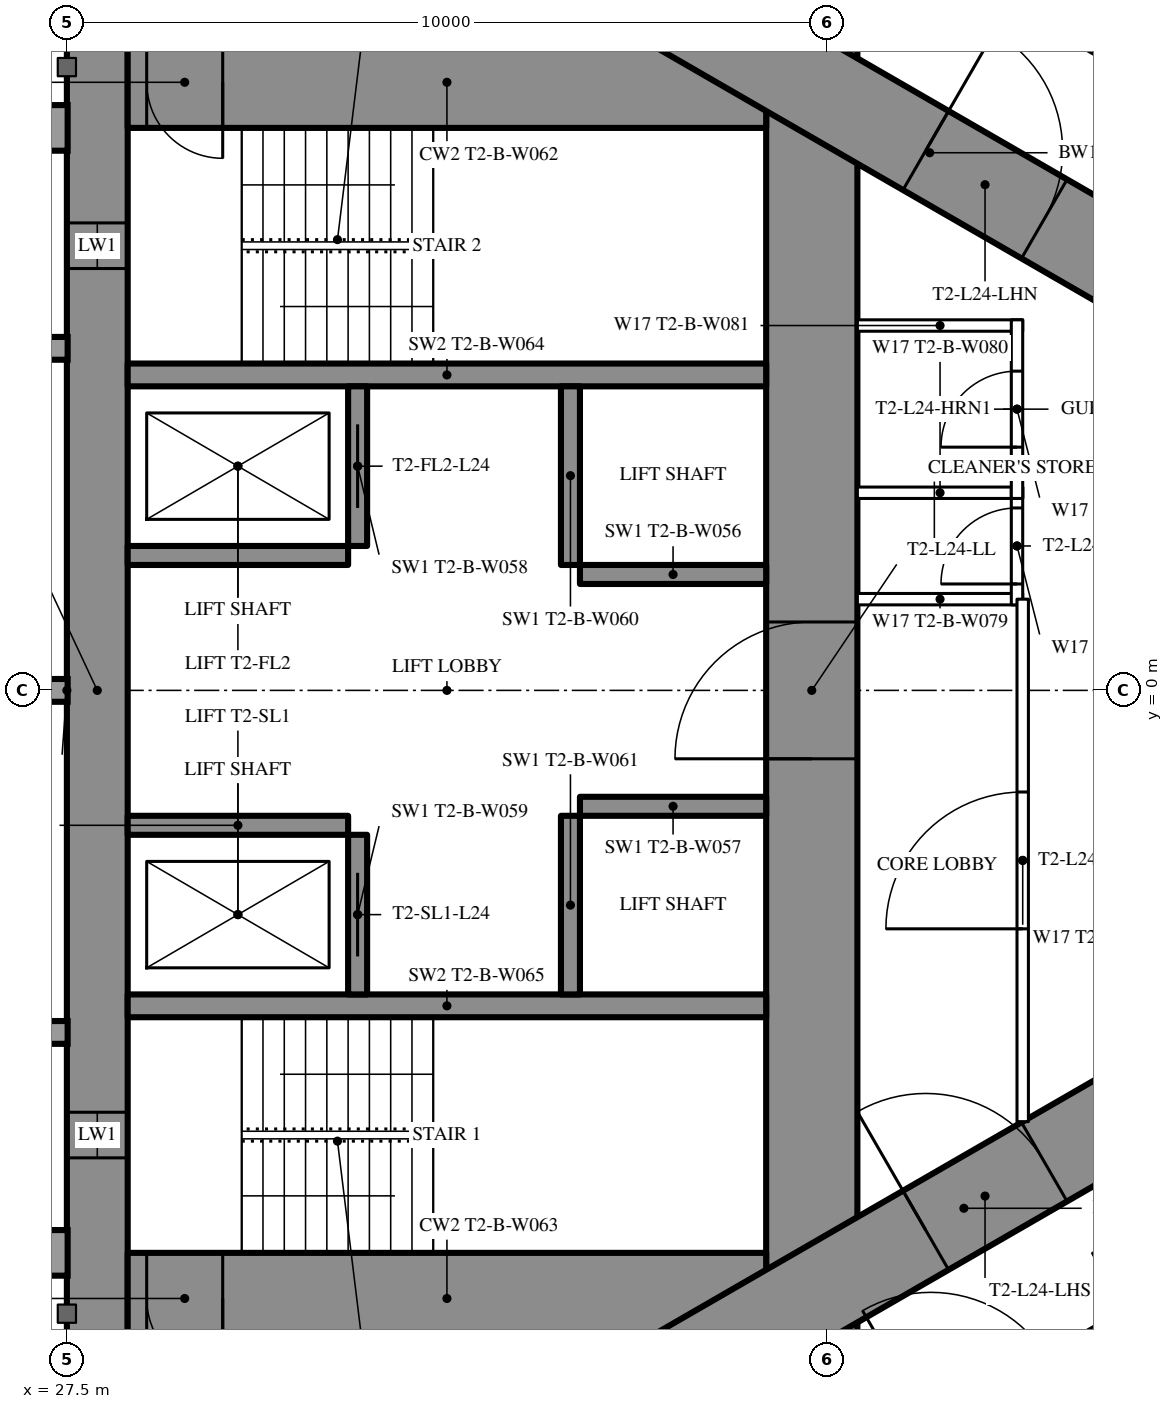
"""IFC4 building model, lengths in metres.
Left out: names, types, materials, properties, quantities, classifications, styles, units other than length and angle.
Written with IfcOpenShell. Run it as: python <this file> out.ifc"""

import sys

from ifc_helpers import new_model, si_unit, direction, frame, frame_2d, origin, place, context, subcontext, project, spatial, rectangle, extrude, element, fill, save


model = new_model("IFC4")
c1 = context("Model", 3, precision=1e-05, world=origin(), true_north=direction((0.0, 1.0)))
c2 = subcontext(c1, "Body", "Model", "MODEL_VIEW")
j1 = project(units=[si_unit("LENGTHUNIT", "METRE"), si_unit("PLANEANGLEUNIT", "RADIAN")], contexts=[c1])
p1 = place(None, origin())
s1 = spatial("IfcSite", under=j1, at=p1, CompositionType="ELEMENT")
p2 = place(p1, origin())
s2 = spatial("IfcBuilding", under=s1, at=p2, CompositionType="ELEMENT")
p3 = place(p2, frame((0.0, 0.0, 94.1)))
s3 = spatial("IfcBuildingStorey", under=s2, at=p3, CompositionType="ELEMENT", Elevation=94.1)
p4 = place(p3, frame((27.9, -8.6, 0.0), z_axis=(0.0, 0.0, 1.0), x_axis=(0.0, 1.0, 0.0)))
e1 = element("IfcWall", 1, at=p4, inside=s3, PredefinedType="SHEAR", context=c2, shape_type="SweptSolid", body=[
    extrude(rectangle(XDim=17.2, YDim=0.8, at=frame_2d((8.6, 0.0))), origin(), (0.0, 0.0, 1.0), 3.5),
])
p5 = place(p4, frame((2.45, 0.0, 0.6)))
e2 = element("IfcOpeningElement", 2, at=p5, cuts=e1, PredefinedType="OPENING", context=c2, shape_type="SweptSolid", body=[
    extrude(rectangle(XDim=0.6, YDim=2.1, at=frame_2d((0.3, 1.05))), frame((0.0, 0.41, 0.0), z_axis=(0.0, -1.0, 0.0), x_axis=(1.0, 0.0, 0.0)), (0.0, 0.0, 1.0), 0.82),
])
p6 = place(p4, frame((14.15, 0.0, 0.6)))
e3 = element("IfcOpeningElement", 3, at=p6, cuts=e1, PredefinedType="OPENING", context=c2, shape_type="SweptSolid", body=[
    extrude(rectangle(XDim=0.6, YDim=2.1, at=frame_2d((0.3, 1.05))), frame((0.0, 0.41, 0.0), z_axis=(0.0, -1.0, 0.0), x_axis=(1.0, 0.0, 0.0)), (0.0, 0.0, 1.0), 0.82),
])
p7 = place(p3, frame((37.3, -8.6, 0.0), z_axis=(0.0, 0.0, 1.0), x_axis=(0.0, 1.0, 0.0)))
e4 = element("IfcWall", 4, at=p7, inside=s3, PredefinedType="SHEAR", context=c2, shape_type="SweptSolid", body=[
    extrude(rectangle(XDim=17.2, YDim=1.2, at=frame_2d((8.6, 0.0))), origin(), (0.0, 0.0, 1.0), 3.5),
])
p8 = place(p7, frame((7.7, 0.0, 0.0)))
e5 = element("IfcOpeningElement", 5, at=p8, cuts=e4, PredefinedType="OPENING", context=c2, shape_type="SweptSolid", body=[
    extrude(rectangle(XDim=1.8, YDim=2.2, at=frame_2d((0.9, 1.1))), frame((0.0, 0.61, 0.0), z_axis=(0.0, -1.0, 0.0), x_axis=(1.0, 0.0, 0.0)), (0.0, 0.0, 1.0), 1.22),
])
p9 = place(p3, frame((28.3, -8.0, 0.0), z_axis=(0.0, 0.0, 1.0), x_axis=(1.0, 0.0, 0.0)))
e6 = element("IfcWall", 6, at=p9, inside=s3, PredefinedType="SHEAR", context=c2, shape_type="SweptSolid", body=[
    extrude(rectangle(XDim=8.4, YDim=1.2, at=frame_2d((4.2, 0.0))), origin(), (0.0, 0.0, 1.0), 3.5),
])
p10 = place(p9, frame((0.25, 0.0, 0.0)))
e7 = element("IfcOpeningElement", 7, at=p10, cuts=e6, PredefinedType="OPENING", context=c2, shape_type="SweptSolid", body=[
    extrude(rectangle(XDim=1.0, YDim=2.2, at=frame_2d((0.5, 1.1))), frame((0.0, 0.61, 0.0), z_axis=(0.0, -1.0, 0.0), x_axis=(1.0, 0.0, 0.0)), (0.0, 0.0, 1.0), 1.22),
])
p11 = place(p3, frame((28.3, 8.0, 0.0), z_axis=(0.0, 0.0, 1.0), x_axis=(1.0, 0.0, 0.0)))
e8 = element("IfcWall", 8, at=p11, inside=s3, PredefinedType="SHEAR", context=c2, shape_type="SweptSolid", body=[
    extrude(rectangle(XDim=8.4, YDim=1.2, at=frame_2d((4.2, 0.0))), origin(), (0.0, 0.0, 1.0), 3.5),
])
p12 = place(p11, frame((0.25, 0.0, 0.0)))
e9 = element("IfcOpeningElement", 9, at=p12, cuts=e8, PredefinedType="OPENING", context=c2, shape_type="SweptSolid", body=[
    extrude(rectangle(XDim=1.0, YDim=2.2, at=frame_2d((0.5, 1.1))), frame((0.0, 0.61, 0.0), z_axis=(0.0, -1.0, 0.0), x_axis=(1.0, 0.0, 0.0)), (0.0, 0.0, 1.0), 1.22),
])
for number, where, z_axis, x_axis in (
    (10, (28.3, -4.15, 0.0), (0.0, 0.0, 1.0), (1.0, 0.0, 0.0)),
    (11, (28.3, 4.15, 0.0), (0.0, 0.0, 1.0), (1.0, 0.0, 0.0)),
):
    element("IfcWall", number, at=place(p3, frame(where, z_axis=z_axis, x_axis=x_axis)), inside=s3, PredefinedType="SHEAR", context=c2, shape_type="SweptSolid", body=[
        extrude(rectangle(XDim=8.4, YDim=0.3, at=frame_2d((4.2, 0.0))), origin(), (0.0, 0.0, 1.0), 3.5),
    ])
p13 = place(p3, frame((31.325, -4.0, 0.0), z_axis=(0.0, 0.0, 1.0), x_axis=(0.0, 1.0, 0.0)))
e12 = element("IfcWall", 12, at=p13, inside=s3, PredefinedType="SHEAR", context=c2, shape_type="SweptSolid", body=[
    extrude(rectangle(XDim=2.1, YDim=0.25, at=frame_2d((1.05, 0.0))), origin(), (0.0, 0.0, 1.0), 3.5),
])
p14 = place(p13, frame((0.5, 0.0, 0.0)))
e13 = element("IfcOpeningElement", 13, at=p14, cuts=e12, PredefinedType="OPENING", context=c2, shape_type="SweptSolid", body=[
    extrude(rectangle(XDim=1.1, YDim=2.2, at=frame_2d((0.55, 1.1))), frame((0.0, 0.135, 0.0), z_axis=(0.0, -1.0, 0.0), x_axis=(1.0, 0.0, 0.0)), (0.0, 0.0, 1.0), 0.27),
])
p15 = place(p3, frame((34.125, -4.0, 0.0), z_axis=(0.0, 0.0, 1.0), x_axis=(0.0, 1.0, 0.0)))
e14 = element("IfcWall", 14, at=p15, inside=s3, PredefinedType="SHEAR", context=c2, shape_type="SweptSolid", body=[
    extrude(rectangle(XDim=2.35, YDim=0.25, at=frame_2d((1.175, 0.0))), origin(), (0.0, 0.0, 1.0), 3.5),
])
p16 = place(p3, frame((28.3, -1.775, 0.0), z_axis=(0.0, 0.0, 1.0), x_axis=(1.0, 0.0, 0.0)))
e15 = element("IfcWall", 15, at=p16, inside=s3, PredefinedType="SHEAR", context=c2, shape_type="SweptSolid", body=[
    extrude(rectangle(XDim=2.9, YDim=0.25, at=frame_2d((1.45, 0.0))), origin(), (0.0, 0.0, 1.0), 3.5),
])
p17 = place(p3, frame((34.25, -1.525, 0.0), z_axis=(0.0, 0.0, 1.0), x_axis=(1.0, 0.0, 0.0)))
e16 = element("IfcWall", 16, at=p17, inside=s3, PredefinedType="SHEAR", context=c2, shape_type="SweptSolid", body=[
    extrude(rectangle(XDim=2.45, YDim=0.25, at=frame_2d((1.225, 0.0))), origin(), (0.0, 0.0, 1.0), 3.5),
])
p18 = place(p3, frame((31.325, 1.9, 0.0), z_axis=(0.0, 0.0, 1.0), x_axis=(0.0, 1.0, 0.0)))
e17 = element("IfcWall", 17, at=p18, inside=s3, PredefinedType="SHEAR", context=c2, shape_type="SweptSolid", body=[
    extrude(rectangle(XDim=2.1, YDim=0.25, at=frame_2d((1.05, 0.0))), origin(), (0.0, 0.0, 1.0), 3.5),
])
p19 = place(p18, frame((0.5, 0.0, 0.0)))
e18 = element("IfcOpeningElement", 18, at=p19, cuts=e17, PredefinedType="OPENING", context=c2, shape_type="SweptSolid", body=[
    extrude(rectangle(XDim=1.1, YDim=2.2, at=frame_2d((0.55, 1.1))), frame((0.0, 0.135, 0.0), z_axis=(0.0, -1.0, 0.0), x_axis=(1.0, 0.0, 0.0)), (0.0, 0.0, 1.0), 0.27),
])
p20 = place(p3, frame((34.125, 1.65, 0.0), z_axis=(0.0, 0.0, 1.0), x_axis=(0.0, 1.0, 0.0)))
e19 = element("IfcWall", 19, at=p20, inside=s3, PredefinedType="SHEAR", context=c2, shape_type="SweptSolid", body=[
    extrude(rectangle(XDim=2.35, YDim=0.25, at=frame_2d((1.175, 0.0))), origin(), (0.0, 0.0, 1.0), 3.5),
])
p21 = place(p3, frame((28.3, 1.775, 0.0), z_axis=(0.0, 0.0, 1.0), x_axis=(1.0, 0.0, 0.0)))
e20 = element("IfcWall", 20, at=p21, inside=s3, PredefinedType="SHEAR", context=c2, shape_type="SweptSolid", body=[
    extrude(rectangle(XDim=2.9, YDim=0.25, at=frame_2d((1.45, 0.0))), origin(), (0.0, 0.0, 1.0), 3.5),
])
p22 = place(p3, frame((34.25, 1.525, 0.0), z_axis=(0.0, 0.0, 1.0), x_axis=(1.0, 0.0, 0.0)))
e21 = element("IfcWall", 21, at=p22, inside=s3, PredefinedType="SHEAR", context=c2, shape_type="SweptSolid", body=[
    extrude(rectangle(XDim=2.45, YDim=0.25, at=frame_2d((1.225, 0.0))), origin(), (0.0, 0.0, 1.0), 3.5),
])
p23 = place(p3, frame((27.2, -13.8, 0.0), z_axis=(0.0, 0.0, 1.0), x_axis=(0.866027159892, 0.499996958321, 0.0)))
e22 = element("IfcWall", 22, at=p23, inside=s3, PredefinedType="SHEAR", context=c2, shape_type="SweptSolid", body=[
    extrude(rectangle(XDim=27.947, YDim=1.2, at=frame_2d((13.973, 0.0))), origin(), (0.0, 0.0, 1.0), 3.5),
])
p24 = place(p23, frame((4.6, 0.0, 0.0)))
e23 = element("IfcOpeningElement", 23, at=p24, cuts=e22, PredefinedType="OPENING", context=c2, shape_type="SweptSolid", body=[
    extrude(rectangle(XDim=1.0, YDim=2.2, at=frame_2d((0.5, 1.1))), frame((0.0, 0.61, 0.0), z_axis=(0.0, -1.0, 0.0), x_axis=(1.0, 0.0, 0.0)), (0.0, 0.0, 1.0), 1.22),
])
p25 = place(p23, frame((13.395, 0.0, 0.0)))
e24 = element("IfcOpeningElement", 24, at=p25, cuts=e22, PredefinedType="OPENING", context=c2, shape_type="SweptSolid", body=[
    extrude(rectangle(XDim=1.8, YDim=2.2, at=frame_2d((0.9, 1.1))), frame((0.0, 0.61, 0.0), z_axis=(0.0, -1.0, 0.0), x_axis=(1.0, 0.0, 0.0)), (0.0, 0.0, 1.0), 1.22),
])
p26 = place(p3, frame((27.2, 13.8, 0.0), z_axis=(0.0, 0.0, 1.0), x_axis=(0.866024515034, -0.500001539357, 0.0)))
e25 = element("IfcWall", 25, at=p26, inside=s3, PredefinedType="SHEAR", context=c2, shape_type="SweptSolid", body=[
    extrude(rectangle(XDim=26.907, YDim=1.2, at=frame_2d((13.454, 0.0))), origin(), (0.0, 0.0, 1.0), 3.5),
])
p27 = place(p26, frame((4.6, 0.0, 0.0)))
e26 = element("IfcOpeningElement", 26, at=p27, cuts=e25, PredefinedType="OPENING", context=c2, shape_type="SweptSolid", body=[
    extrude(rectangle(XDim=1.0, YDim=2.2, at=frame_2d((0.5, 1.1))), frame((0.0, 0.61, 0.0), z_axis=(0.0, -1.0, 0.0), x_axis=(1.0, 0.0, 0.0)), (0.0, 0.0, 1.0), 1.22),
])
p28 = place(p26, frame((13.395, 0.0, 0.0)))
e27 = element("IfcOpeningElement", 27, at=p28, cuts=e25, PredefinedType="OPENING", context=c2, shape_type="SweptSolid", body=[
    extrude(rectangle(XDim=1.8, YDim=2.2, at=frame_2d((0.9, 1.1))), frame((0.0, 0.61, 0.0), z_axis=(0.0, -1.0, 0.0), x_axis=(1.0, 0.0, 0.0)), (0.0, 0.0, 1.0), 1.22),
])
p29 = place(p3, frame((37.96, -10.243, 0.0), z_axis=(0.0, 0.0, 1.0), x_axis=(0.866026429433, 0.499998223521, 0.0)))
e28 = element("IfcWall", 28, at=p29, inside=s3, PredefinedType="PARTITIONING", context=c2, shape_type="SweptSolid", body=[
    extrude(rectangle(XDim=20.487, YDim=0.2, at=frame_2d((10.243, 0.0))), origin(), (0.0, 0.0, 1.0), 3.25),
])
p30 = place(p29, frame((4.047, 0.0, 0.0)))
e29 = element("IfcOpeningElement", 29, at=p30, cuts=e28, PredefinedType="OPENING", context=c2, shape_type="SweptSolid", body=[
    extrude(rectangle(XDim=0.95, YDim=2.2, at=frame_2d((0.475, 1.1))), frame((0.0, 0.11, 0.0), z_axis=(0.0, -1.0, 0.0), x_axis=(1.0, 0.0, 0.0)), (0.0, 0.0, 1.0), 0.22),
])
p31 = place(p29, frame((11.04, 0.0, 0.0)))
e30 = element("IfcOpeningElement", 30, at=p31, cuts=e28, PredefinedType="OPENING", context=c2, shape_type="SweptSolid", body=[
    extrude(rectangle(XDim=0.95, YDim=2.2, at=frame_2d((0.475, 1.1))), frame((0.0, 0.11, 0.0), z_axis=(0.0, -1.0, 0.0), x_axis=(1.0, 0.0, 0.0)), (0.0, 0.0, 1.0), 0.22),
])
p32 = place(p29, frame((13.035, 0.0, 0.0)))
e31 = element("IfcOpeningElement", 31, at=p32, cuts=e28, PredefinedType="OPENING", context=c2, shape_type="SweptSolid", body=[
    extrude(rectangle(XDim=0.95, YDim=2.2, at=frame_2d((0.475, 1.1))), frame((0.0, 0.11, 0.0), z_axis=(0.0, -1.0, 0.0), x_axis=(1.0, 0.0, 0.0)), (0.0, 0.0, 1.0), 0.22),
])
p33 = place(p29, frame((17.085, 0.0, 0.0)))
e32 = element("IfcOpeningElement", 32, at=p33, cuts=e28, PredefinedType="OPENING", context=c2, shape_type="SweptSolid", body=[
    extrude(rectangle(XDim=0.95, YDim=2.2, at=frame_2d((0.475, 1.1))), frame((0.0, 0.11, 0.0), z_axis=(0.0, -1.0, 0.0), x_axis=(1.0, 0.0, 0.0)), (0.0, 0.0, 1.0), 0.22),
])
p34 = place(p29, frame((1.048, 0.0, 0.0)))
e33 = element("IfcOpeningElement", 33, at=p34, cuts=e28, PredefinedType="OPENING", context=c2, shape_type="SweptSolid", body=[
    extrude(rectangle(XDim=1.8, YDim=2.2, at=frame_2d((0.9, 1.1))), frame((0.0, 0.11, 0.0), z_axis=(0.0, -1.0, 0.0), x_axis=(1.0, 0.0, 0.0)), (0.0, 0.0, 1.0), 0.22),
])
p35 = place(p3, frame((36.834, 10.894, 0.0), z_axis=(0.0, 0.0, 1.0), x_axis=(0.866028157229, -0.499995230863, 0.0)))
e34 = element("IfcWall", 34, at=p35, inside=s3, PredefinedType="PARTITIONING", context=c2, shape_type="SweptSolid", body=[
    extrude(rectangle(XDim=21.667, YDim=0.2, at=frame_2d((10.833, 0.0))), origin(), (0.0, 0.0, 1.0), 3.25),
])
p36 = place(p35, frame((14.04, 0.0, 0.0)))
e35 = element("IfcOpeningElement", 35, at=p36, cuts=e34, PredefinedType="OPENING", context=c2, shape_type="SweptSolid", body=[
    extrude(rectangle(XDim=0.95, YDim=2.2, at=frame_2d((0.475, 1.1))), frame((0.0, 0.11, 0.0), z_axis=(0.0, -1.0, 0.0), x_axis=(1.0, 0.0, 0.0)), (0.0, 0.0, 1.0), 0.22),
])
p37 = place(p35, frame((9.99, 0.0, 0.0)))
e36 = element("IfcOpeningElement", 36, at=p37, cuts=e34, PredefinedType="OPENING", context=c2, shape_type="SweptSolid", body=[
    extrude(rectangle(XDim=0.95, YDim=2.2, at=frame_2d((0.475, 1.1))), frame((0.0, 0.11, 0.0), z_axis=(0.0, -1.0, 0.0), x_axis=(1.0, 0.0, 0.0)), (0.0, 0.0, 1.0), 0.22),
])
p38 = place(p35, frame((3.35, 0.0, 0.0)))
e37 = element("IfcOpeningElement", 37, at=p38, cuts=e34, PredefinedType="OPENING", context=c2, shape_type="SweptSolid", body=[
    extrude(rectangle(XDim=1.0, YDim=2.2, at=frame_2d((0.5, 1.1))), frame((0.0, 0.11, 0.0), z_axis=(0.0, -1.0, 0.0), x_axis=(1.0, 0.0, 0.0)), (0.0, 0.0, 1.0), 0.22),
])
for number, where, z_axis, x_axis in (
    (38, (37.9, 1.2, 0.0), (0.0, 0.0, 1.0), (1.0, 0.0, 0.0)),
    (39, (37.9, 2.6, 0.0), (0.0, 0.0, 1.0), (1.0, 0.0, 0.0)),
    (40, (37.9, 4.8, 0.0), (0.0, 0.0, 1.0), (1.0, 0.0, 0.0)),
):
    element("IfcWall", number, at=place(p3, frame(where, z_axis=z_axis, x_axis=x_axis)), inside=s3, PredefinedType="PARTITIONING", context=c2, shape_type="SweptSolid", body=[
        extrude(rectangle(XDim=2.175, YDim=0.15, at=frame_2d((1.087, 0.0))), origin(), (0.0, 0.0, 1.0), 3.25),
    ])
p39 = place(p3, frame((40.0, 1.125, 0.0), z_axis=(0.0, 0.0, 1.0), x_axis=(0.0, 1.0, 0.0)))
e41 = element("IfcWall", 41, at=p39, inside=s3, PredefinedType="PARTITIONING", context=c2, shape_type="SweptSolid", body=[
    extrude(rectangle(XDim=1.55, YDim=0.15, at=frame_2d((0.775, 0.0))), origin(), (0.0, 0.0, 1.0), 3.25),
])
p40 = place(p39, frame((0.275, 0.0, 0.0)))
e42 = element("IfcOpeningElement", 42, at=p40, cuts=e41, PredefinedType="OPENING", context=c2, shape_type="SweptSolid", body=[
    extrude(rectangle(XDim=1.0, YDim=2.2, at=frame_2d((0.5, 1.1))), frame((0.0, 0.085, 0.0), z_axis=(0.0, -1.0, 0.0), x_axis=(1.0, 0.0, 0.0)), (0.0, 0.0, 1.0), 0.17),
])
p41 = place(p3, frame((40.0, 2.525, 0.0), z_axis=(0.0, 0.0, 1.0), x_axis=(0.0, 1.0, 0.0)))
e43 = element("IfcWall", 43, at=p41, inside=s3, PredefinedType="PARTITIONING", context=c2, shape_type="SweptSolid", body=[
    extrude(rectangle(XDim=2.35, YDim=0.15, at=frame_2d((1.175, 0.0))), origin(), (0.0, 0.0, 1.0), 3.25),
])
p42 = place(p41, frame((0.675, 0.0, 0.0)))
e44 = element("IfcOpeningElement", 44, at=p42, cuts=e43, PredefinedType="OPENING", context=c2, shape_type="SweptSolid", body=[
    extrude(rectangle(XDim=1.0, YDim=2.2, at=frame_2d((0.5, 1.1))), frame((0.0, 0.085, 0.0), z_axis=(0.0, -1.0, 0.0), x_axis=(1.0, 0.0, 0.0)), (0.0, 0.0, 1.0), 0.17),
])
p43 = place(p3, frame((40.075, -5.674, 0.0), z_axis=(0.0, 0.0, 1.0), x_axis=(0.0, 1.0, 0.0)))
e45 = element("IfcWall", 45, at=p43, inside=s3, PredefinedType="PARTITIONING", context=c2, shape_type="SweptSolid", body=[
    extrude(rectangle(XDim=6.874, YDim=0.15, at=frame_2d((3.437, 0.0))), origin(), (0.0, 0.0, 1.0), 3.25),
])
p44 = place(p43, frame((2.537, 0.0, 0.0)))
e46 = element("IfcOpeningElement", 46, at=p44, cuts=e45, PredefinedType="OPENING", context=c2, shape_type="SweptSolid", body=[
    extrude(rectangle(XDim=1.8, YDim=2.2, at=frame_2d((0.9, 1.1))), frame((0.0, 0.085, 0.0), z_axis=(0.0, -1.0, 0.0), x_axis=(1.0, 0.0, 0.0)), (0.0, 0.0, 1.0), 0.17),
])
p45 = place(p40, origin())
e47 = element("IfcDoor", 47, at=p45, inside=s3, OperationType="SINGLE_SWING_LEFT", PredefinedType="DOOR", context=c2, shape_type="SweptSolid", body=[
    extrude(rectangle(XDim=1.0, YDim=2.2, at=frame_2d((0.5, 1.1))), frame((0.0, 0.025, 0.0), z_axis=(0.0, -1.0, 0.0), x_axis=(1.0, 0.0, 0.0)), (0.0, 0.0, 1.0), 0.05),
])
fill(e42, e47)
p46 = place(p42, origin())
e48 = element("IfcDoor", 48, at=p46, inside=s3, OperationType="SINGLE_SWING_LEFT", PredefinedType="DOOR", context=c2, shape_type="SweptSolid", body=[
    extrude(rectangle(XDim=1.0, YDim=2.2, at=frame_2d((0.5, 1.1))), frame((0.0, 0.025, 0.0), z_axis=(0.0, -1.0, 0.0), x_axis=(1.0, 0.0, 0.0)), (0.0, 0.0, 1.0), 0.05),
])
fill(e44, e48)
p47 = place(p44, origin())
e49 = element("IfcDoor", 49, at=p47, inside=s3, OperationType="DOUBLE_DOOR_SINGLE_SWING", PredefinedType="DOOR", context=c2, shape_type="SweptSolid", body=[
    extrude(rectangle(XDim=1.8, YDim=2.2, at=frame_2d((0.9, 1.1))), frame((0.0, 0.025, 0.0), z_axis=(0.0, -1.0, 0.0), x_axis=(1.0, 0.0, 0.0)), (0.0, 0.0, 1.0), 0.05),
])
fill(e46, e49)
p48 = place(p25, origin())
e50 = element("IfcDoor", 50, at=p48, inside=s3, OperationType="DOUBLE_DOOR_SINGLE_SWING", PredefinedType="DOOR", context=c2, shape_type="SweptSolid", body=[
    extrude(rectangle(XDim=1.8, YDim=2.2, at=frame_2d((0.9, 1.1))), frame((0.0, 0.025, 0.0), z_axis=(0.0, -1.0, 0.0), x_axis=(1.0, 0.0, 0.0)), (0.0, 0.0, 1.0), 0.05),
])
fill(e24, e50)
p49 = place(p28, origin())
e51 = element("IfcDoor", 51, at=p49, inside=s3, OperationType="DOUBLE_DOOR_SINGLE_SWING", PredefinedType="DOOR", context=c2, shape_type="SweptSolid", body=[
    extrude(rectangle(XDim=1.8, YDim=2.2, at=frame_2d((0.9, 1.1))), frame((0.0, 0.025, 0.0), z_axis=(0.0, -1.0, 0.0), x_axis=(1.0, 0.0, 0.0)), (0.0, 0.0, 1.0), 0.05),
])
fill(e27, e51)
p50 = place(p8, origin())
e52 = element("IfcDoor", 52, at=p50, inside=s3, OperationType="DOUBLE_DOOR_SINGLE_SWING", PredefinedType="DOOR", context=c2, shape_type="SweptSolid", body=[
    extrude(rectangle(XDim=1.8, YDim=2.2, at=frame_2d((0.9, 1.1))), frame((0.0, 0.025, 0.0), z_axis=(0.0, -1.0, 0.0), x_axis=(1.0, 0.0, 0.0)), (0.0, 0.0, 1.0), 0.05),
])
fill(e5, e52)
p51 = place(p10, origin())
e53 = element("IfcDoor", 53, at=p51, inside=s3, OperationType="SINGLE_SWING_RIGHT", PredefinedType="DOOR", context=c2, shape_type="SweptSolid", body=[
    extrude(rectangle(XDim=1.0, YDim=2.2, at=frame_2d((0.5, 1.1))), frame((0.0, 0.025, 0.0), z_axis=(0.0, -1.0, 0.0), x_axis=(1.0, 0.0, 0.0)), (0.0, 0.0, 1.0), 0.05),
])
fill(e7, e53)
p52 = place(p12, origin())
e54 = element("IfcDoor", 54, at=p52, inside=s3, OperationType="SINGLE_SWING_RIGHT", PredefinedType="DOOR", context=c2, shape_type="SweptSolid", body=[
    extrude(rectangle(XDim=1.0, YDim=2.2, at=frame_2d((0.5, 1.1))), frame((0.0, 0.025, 0.0), z_axis=(0.0, -1.0, 0.0), x_axis=(1.0, 0.0, 0.0)), (0.0, 0.0, 1.0), 0.05),
])
fill(e9, e54)
p53 = place(p14, origin())
e55 = element("IfcDoor", 55, at=p53, inside=s3, OperationType="SLIDING_TO_LEFT", PredefinedType="USERDEFINED", context=c2, shape_type="SweptSolid", body=[
    extrude(rectangle(XDim=1.1, YDim=2.2, at=frame_2d((0.55, 1.1))), frame((0.0, 0.025, 0.0), z_axis=(0.0, -1.0, 0.0), x_axis=(1.0, 0.0, 0.0)), (0.0, 0.0, 1.0), 0.05),
])
fill(e13, e55)
p54 = place(p19, origin())
e56 = element("IfcDoor", 56, at=p54, inside=s3, OperationType="SLIDING_TO_LEFT", PredefinedType="USERDEFINED", context=c2, shape_type="SweptSolid", body=[
    extrude(rectangle(XDim=1.1, YDim=2.2, at=frame_2d((0.55, 1.1))), frame((0.0, 0.025, 0.0), z_axis=(0.0, -1.0, 0.0), x_axis=(1.0, 0.0, 0.0)), (0.0, 0.0, 1.0), 0.05),
])
fill(e18, e56)
p55 = place(p5, origin())
e57 = element("IfcWindow", 57, at=p55, inside=s3, PartitioningType="SINGLE_PANEL", PredefinedType="WINDOW", context=c2, shape_type="SweptSolid", body=[
    extrude(rectangle(XDim=0.6, YDim=2.1, at=frame_2d((0.3, 1.05))), frame((0.0, 0.03, 0.0), z_axis=(0.0, -1.0, 0.0), x_axis=(1.0, 0.0, 0.0)), (0.0, 0.0, 1.0), 0.06),
])
fill(e2, e57)
p56 = place(p6, origin())
e58 = element("IfcWindow", 58, at=p56, inside=s3, PartitioningType="SINGLE_PANEL", PredefinedType="WINDOW", context=c2, shape_type="SweptSolid", body=[
    extrude(rectangle(XDim=0.6, YDim=2.1, at=frame_2d((0.3, 1.05))), frame((0.0, 0.03, 0.0), z_axis=(0.0, -1.0, 0.0), x_axis=(1.0, 0.0, 0.0)), (0.0, 0.0, 1.0), 0.06),
])
fill(e3, e58)
save(model, sys.argv[1])
